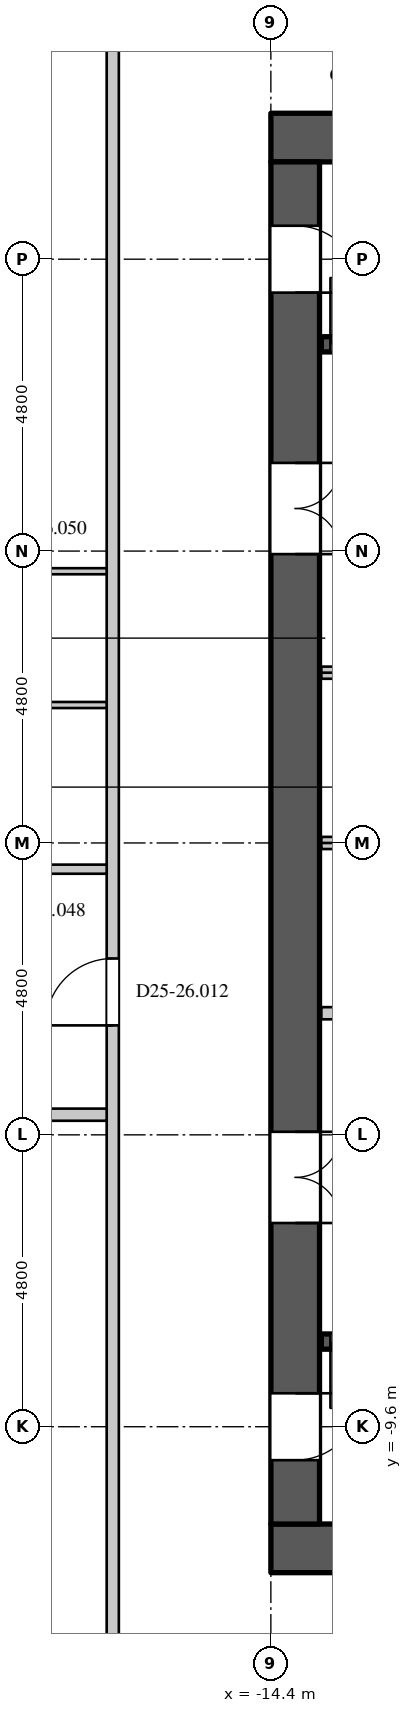
"""IFC4 building model, lengths in metres.
Left out: names, types, materials, properties, quantities, classifications, styles, units other than length and angle.
Written with IfcOpenShell. Run it as: python <this file> out.ifc"""

import sys

from ifc_helpers import new_model, si_unit, direction, frame, frame_2d, origin, place, context, subcontext, project, spatial, rectangle, extrude, element, fill, save


model = new_model("IFC4")
c1 = context("Model", 3, precision=1e-05, world=origin(), true_north=direction((0.0, 1.0)))
c2 = subcontext(c1, "Body", "Model", "MODEL_VIEW")
j1 = project(units=[si_unit("LENGTHUNIT", "METRE"), si_unit("PLANEANGLEUNIT", "RADIAN")], contexts=[c1])
p1 = place(None, origin())
s1 = spatial("IfcSite", under=j1, at=p1, CompositionType="ELEMENT")
p2 = place(p1, origin())
s2 = spatial("IfcBuilding", under=s1, at=p2, CompositionType="ELEMENT")
p3 = place(p2, frame((0.0, 0.0, 110.7)))
s3 = spatial("IfcBuildingStorey", under=s2, at=p3, CompositionType="ELEMENT", Elevation=110.7)
for number, where, z_axis, x_axis in (
    (1, (-14.4, 11.6, 0.0), (0.0, 0.0, 1.0), (1.0, 0.0, 0.0)),
    (2, (-14.4, -11.6, 0.0), (0.0, 0.0, 1.0), (1.0, 0.0, 0.0)),
):
    element("IfcWall", number, at=place(p3, frame(where, z_axis=z_axis, x_axis=x_axis)), inside=s3, PredefinedType="SHEAR", context=c2, shape_type="SweptSolid", body=[
        extrude(rectangle(XDim=28.8, YDim=0.8, at=frame_2d((14.4, 0.0))), origin(), (0.0, 0.0, 1.0), 4.2),
    ])
p4 = place(p3, frame((-14.0, -11.2, 0.0), z_axis=(0.0, 0.0, 1.0), x_axis=(0.0, 1.0, 0.0)))
e3 = element("IfcWall", 3, at=p4, inside=s3, PredefinedType="SHEAR", context=c2, shape_type="SweptSolid", body=[
    extrude(rectangle(XDim=22.4, YDim=0.8, at=frame_2d((11.2, 0.0))), origin(), (0.0, 0.0, 1.0), 4.2),
])
p5 = place(p4, frame((20.25, 0.0, 0.0)))
e4 = element("IfcOpeningElement", 4, at=p5, cuts=e3, PredefinedType="OPENING", context=c2, shape_type="SweptSolid", body=[
    extrude(rectangle(XDim=1.1, YDim=2.2, at=frame_2d((0.55, 1.1))), frame((0.0, 0.41, 0.0), z_axis=(0.0, -1.0, 0.0), x_axis=(1.0, 0.0, 0.0)), (0.0, 0.0, 1.0), 0.82),
])
p6 = place(p4, frame((1.05, 0.0, 0.0)))
e5 = element("IfcOpeningElement", 5, at=p6, cuts=e3, PredefinedType="OPENING", context=c2, shape_type="SweptSolid", body=[
    extrude(rectangle(XDim=1.1, YDim=2.2, at=frame_2d((0.55, 1.1))), frame((0.0, 0.41, 0.0), z_axis=(0.0, -1.0, 0.0), x_axis=(1.0, 0.0, 0.0)), (0.0, 0.0, 1.0), 0.82),
])
p7 = place(p4, frame((15.95, 0.0, 0.0)))
e6 = element("IfcOpeningElement", 6, at=p7, cuts=e3, PredefinedType="OPENING", context=c2, shape_type="SweptSolid", body=[
    extrude(rectangle(XDim=1.5, YDim=2.4, at=frame_2d((0.75, 1.2))), frame((0.0, 0.41, 0.0), z_axis=(0.0, -1.0, 0.0), x_axis=(1.0, 0.0, 0.0)), (0.0, 0.0, 1.0), 0.82),
])
p8 = place(p4, frame((4.95, 0.0, 0.0)))
e7 = element("IfcOpeningElement", 7, at=p8, cuts=e3, PredefinedType="OPENING", context=c2, shape_type="SweptSolid", body=[
    extrude(rectangle(XDim=1.5, YDim=2.4, at=frame_2d((0.75, 1.2))), frame((0.0, 0.41, 0.0), z_axis=(0.0, -1.0, 0.0), x_axis=(1.0, 0.0, 0.0)), (0.0, 0.0, 1.0), 0.82),
])
p9 = place(p3, frame((-17.0, -14.5, 0.0), z_axis=(0.0, 0.0, 1.0), x_axis=(0.0, 1.0, 0.0)))
e8 = element("IfcWall", 8, at=p9, inside=s3, PredefinedType="PARTITIONING", context=c2, shape_type="SweptSolid", body=[
    extrude(rectangle(XDim=29.0, YDim=0.2, at=frame_2d((14.5, 0.0))), origin(), (0.0, 0.0, 1.0), 3.95),
])
p10 = place(p9, frame((11.5, 0.0, 0.0)))
e9 = element("IfcOpeningElement", 9, at=p10, cuts=e8, PredefinedType="OPENING", context=c2, shape_type="SweptSolid", body=[
    extrude(rectangle(XDim=1.1, YDim=2.4, at=frame_2d((0.55, 1.2))), frame((0.0, 0.11, 0.0), z_axis=(0.0, -1.0, 0.0), x_axis=(1.0, 0.0, 0.0)), (0.0, 0.0, 1.0), 0.22),
])
p11 = place(p3, frame((-21.547, -11.471, 0.0), z_axis=(0.0, 0.0, 1.0), x_axis=(0.707106781187, -0.707106781187, 0.0)))
e10 = element("IfcWall", 10, at=p11, inside=s3, PredefinedType="PARTITIONING", context=c2, shape_type="SweptSolid", body=[
    extrude(rectangle(XDim=7.125, YDim=0.15, at=frame_2d((3.562, 0.0))), origin(), (0.0, 0.0, 1.0), 3.95),
])
p12 = place(p11, frame((2.85, 0.0, 0.0)))
e11 = element("IfcOpeningElement", 11, at=p12, cuts=e10, PredefinedType="OPENING", context=c2, shape_type="SweptSolid", body=[
    extrude(rectangle(XDim=0.95, YDim=2.2, at=frame_2d((0.475, 1.1))), frame((0.0, 0.085, 0.0), z_axis=(0.0, -1.0, 0.0), x_axis=(1.0, 0.0, 0.0)), (0.0, 0.0, 1.0), 0.17),
])
p13 = place(p3, frame((-21.547, 11.471, 0.0), z_axis=(0.0, 0.0, 1.0), x_axis=(0.707106781187, 0.707106781187, 0.0)))
e12 = element("IfcWall", 12, at=p13, inside=s3, PredefinedType="PARTITIONING", context=c2, shape_type="SweptSolid", body=[
    extrude(rectangle(XDim=7.05, YDim=0.15, at=frame_2d((3.525, 0.0))), origin(), (0.0, 0.0, 1.0), 3.95),
])
p14 = place(p13, frame((2.85, 0.0, 0.0)))
e13 = element("IfcOpeningElement", 13, at=p14, cuts=e12, PredefinedType="OPENING", context=c2, shape_type="SweptSolid", body=[
    extrude(rectangle(XDim=0.95, YDim=2.2, at=frame_2d((0.475, 1.1))), frame((0.0, 0.085, 0.0), z_axis=(0.0, -1.0, 0.0), x_axis=(1.0, 0.0, 0.0)), (0.0, 0.0, 1.0), 0.17),
])
p15 = place(p3, frame((-20.725, -0.431, 0.0), z_axis=(0.0, 0.0, 1.0), x_axis=(1.0, 0.0, 0.0)))
e14 = element("IfcWall", 14, at=p15, inside=s3, PredefinedType="PARTITIONING", context=c2, shape_type="SweptSolid", body=[
    extrude(rectangle(XDim=3.625, YDim=0.15, at=frame_2d((1.812, 0.0))), origin(), (0.0, 0.0, 1.0), 3.95),
])
p16 = place(p15, frame((0.85, 0.0, 0.0)))
e15 = element("IfcOpeningElement", 15, at=p16, cuts=e14, PredefinedType="OPENING", context=c2, shape_type="SweptSolid", body=[
    extrude(rectangle(XDim=0.95, YDim=2.2, at=frame_2d((0.475, 1.1))), frame((0.0, 0.085, 0.0), z_axis=(0.0, -1.0, 0.0), x_axis=(1.0, 0.0, 0.0)), (0.0, 0.0, 1.0), 0.17),
])
p17 = place(p3, frame((-25.65, -4.469, 0.0), z_axis=(0.0, 0.0, 1.0), x_axis=(1.0, 0.0, 0.0)))
e16 = element("IfcWall", 16, at=p17, inside=s3, PredefinedType="PARTITIONING", context=c2, shape_type="SweptSolid", body=[
    extrude(rectangle(XDim=8.55, YDim=0.2, at=frame_2d((4.275, 0.0))), origin(), (0.0, 0.0, 1.0), 3.3),
])
p18 = place(p3, frame((-13.57, -2.8, 0.0), z_axis=(0.0, 0.0, 1.0), x_axis=(1.0, 0.0, 0.0)))
e17 = element("IfcWall", 17, at=p18, inside=s3, PredefinedType="PARTITIONING", context=c2, shape_type="SweptSolid", body=[
    extrude(rectangle(XDim=3.19, YDim=0.2, at=frame_2d((1.595, 0.0))), origin(), (0.0, 0.0, 1.0), 3.95),
])
p19 = place(p18, frame((1.25, 0.0, 0.0)))
e18 = element("IfcOpeningElement", 18, at=p19, cuts=e17, PredefinedType="OPENING", context=c2, shape_type="SweptSolid", body=[
    extrude(rectangle(XDim=0.6, YDim=2.0, at=frame_2d((0.3, 1.0))), frame((0.0, 0.11, 0.0), z_axis=(0.0, -1.0, 0.0), x_axis=(1.0, 0.0, 0.0)), (0.0, 0.0, 1.0), 0.22),
])
p20 = place(p3, frame((-13.57, 0.0, 0.0), z_axis=(0.0, 0.0, 1.0), x_axis=(1.0, 0.0, 0.0)))
e19 = element("IfcWall", 19, at=p20, inside=s3, PredefinedType="PARTITIONING", context=c2, shape_type="SweptSolid", body=[
    extrude(rectangle(XDim=23.97, YDim=0.2, at=frame_2d((11.985, 0.0))), origin(), (0.0, 0.0, 1.0), 3.95),
])
p21 = place(p3, frame((-13.57, 2.8, 0.0), z_axis=(0.0, 0.0, 1.0), x_axis=(1.0, 0.0, 0.0)))
e20 = element("IfcWall", 20, at=p21, inside=s3, PredefinedType="PARTITIONING", context=c2, shape_type="SweptSolid", body=[
    extrude(rectangle(XDim=23.97, YDim=0.2, at=frame_2d((11.985, 0.0))), origin(), (0.0, 0.0, 1.0), 3.95),
])
p22 = place(p21, frame((1.0, 0.0, 0.0)))
e21 = element("IfcOpeningElement", 21, at=p22, cuts=e20, PredefinedType="OPENING", context=c2, shape_type="SweptSolid", body=[
    extrude(rectangle(XDim=1.1, YDim=2.2, at=frame_2d((0.55, 1.1))), frame((0.0, 0.11, 0.0), z_axis=(0.0, -1.0, 0.0), x_axis=(1.0, 0.0, 0.0)), (0.0, 0.0, 1.0), 0.22),
])
p23 = place(p21, frame((3.9, 0.0, 0.0)))
e22 = element("IfcOpeningElement", 22, at=p23, cuts=e20, PredefinedType="OPENING", context=c2, shape_type="SweptSolid", body=[
    extrude(rectangle(XDim=1.1, YDim=2.2, at=frame_2d((0.55, 1.1))), frame((0.0, 0.11, 0.0), z_axis=(0.0, -1.0, 0.0), x_axis=(1.0, 0.0, 0.0)), (0.0, 0.0, 1.0), 0.22),
])
p24 = place(p21, frame((6.5, 0.0, 0.0)))
e23 = element("IfcOpeningElement", 23, at=p24, cuts=e20, PredefinedType="OPENING", context=c2, shape_type="SweptSolid", body=[
    extrude(rectangle(XDim=1.1, YDim=2.2, at=frame_2d((0.55, 1.1))), frame((0.0, 0.11, 0.0), z_axis=(0.0, -1.0, 0.0), x_axis=(1.0, 0.0, 0.0)), (0.0, 0.0, 1.0), 0.22),
])
p25 = place(p21, frame((9.1, 0.0, 0.0)))
e24 = element("IfcOpeningElement", 24, at=p25, cuts=e20, PredefinedType="OPENING", context=c2, shape_type="SweptSolid", body=[
    extrude(rectangle(XDim=1.1, YDim=2.2, at=frame_2d((0.55, 1.1))), frame((0.0, 0.11, 0.0), z_axis=(0.0, -1.0, 0.0), x_axis=(1.0, 0.0, 0.0)), (0.0, 0.0, 1.0), 0.22),
])
p26 = place(p21, frame((11.7, 0.0, 0.0)))
e25 = element("IfcOpeningElement", 25, at=p26, cuts=e20, PredefinedType="OPENING", context=c2, shape_type="SweptSolid", body=[
    extrude(rectangle(XDim=1.1, YDim=2.2, at=frame_2d((0.55, 1.1))), frame((0.0, 0.11, 0.0), z_axis=(0.0, -1.0, 0.0), x_axis=(1.0, 0.0, 0.0)), (0.0, 0.0, 1.0), 0.22),
])
p27 = place(p21, frame((14.3, 0.0, 0.0)))
e26 = element("IfcOpeningElement", 26, at=p27, cuts=e20, PredefinedType="OPENING", context=c2, shape_type="SweptSolid", body=[
    extrude(rectangle(XDim=1.1, YDim=2.2, at=frame_2d((0.55, 1.1))), frame((0.0, 0.11, 0.0), z_axis=(0.0, -1.0, 0.0), x_axis=(1.0, 0.0, 0.0)), (0.0, 0.0, 1.0), 0.22),
])
p28 = place(p21, frame((16.9, 0.0, 0.0)))
e27 = element("IfcOpeningElement", 27, at=p28, cuts=e20, PredefinedType="OPENING", context=c2, shape_type="SweptSolid", body=[
    extrude(rectangle(XDim=1.1, YDim=2.2, at=frame_2d((0.55, 1.1))), frame((0.0, 0.11, 0.0), z_axis=(0.0, -1.0, 0.0), x_axis=(1.0, 0.0, 0.0)), (0.0, 0.0, 1.0), 0.22),
])
p29 = place(p21, frame((19.5, 0.0, 0.0)))
e28 = element("IfcOpeningElement", 28, at=p29, cuts=e20, PredefinedType="OPENING", context=c2, shape_type="SweptSolid", body=[
    extrude(rectangle(XDim=1.1, YDim=2.2, at=frame_2d((0.55, 1.1))), frame((0.0, 0.11, 0.0), z_axis=(0.0, -1.0, 0.0), x_axis=(1.0, 0.0, 0.0)), (0.0, 0.0, 1.0), 0.22),
])
p30 = place(p3, frame((-13.57, -8.2, 0.0), z_axis=(0.0, 0.0, 1.0), x_axis=(1.0, 0.0, 0.0)))
e29 = element("IfcWall", 29, at=p30, inside=s3, PredefinedType="SHEAR", context=c2, shape_type="SweptSolid", body=[
    extrude(rectangle(XDim=8.295, YDim=0.25, at=frame_2d((4.147, 0.0))), origin(), (0.0, 0.0, 1.0), 3.95),
])
p31 = place(p30, frame((0.15, 0.0, 0.0)))
e30 = element("IfcOpeningElement", 30, at=p31, cuts=e29, PredefinedType="OPENING", context=c2, shape_type="SweptSolid", body=[
    extrude(rectangle(XDim=1.1, YDim=2.2, at=frame_2d((0.55, 1.1))), frame((0.0, 0.135, 0.0), z_axis=(0.0, -1.0, 0.0), x_axis=(1.0, 0.0, 0.0)), (0.0, 0.0, 1.0), 0.27),
])
p32 = place(p3, frame((-13.57, 8.2, 0.0), z_axis=(0.0, 0.0, 1.0), x_axis=(1.0, 0.0, 0.0)))
e31 = element("IfcWall", 31, at=p32, inside=s3, PredefinedType="SHEAR", context=c2, shape_type="SweptSolid", body=[
    extrude(rectangle(XDim=8.295, YDim=0.25, at=frame_2d((4.147, 0.0))), origin(), (0.0, 0.0, 1.0), 3.95),
])
p33 = place(p32, frame((0.15, 0.0, 0.0)))
e32 = element("IfcOpeningElement", 32, at=p33, cuts=e31, PredefinedType="OPENING", context=c2, shape_type="SweptSolid", body=[
    extrude(rectangle(XDim=1.1, YDim=2.2, at=frame_2d((0.55, 1.1))), frame((0.0, 0.135, 0.0), z_axis=(0.0, -1.0, 0.0), x_axis=(1.0, 0.0, 0.0)), (0.0, 0.0, 1.0), 0.27),
])
p34 = place(p3, frame((-20.78, 4.469, 0.0), z_axis=(0.0, 0.0, 1.0), x_axis=(1.0, 0.0, 0.0)))
e33 = element("IfcWall", 33, at=p34, inside=s3, PredefinedType="PARTITIONING", context=c2, shape_type="SweptSolid", body=[
    extrude(rectangle(XDim=3.68, YDim=0.1, at=frame_2d((1.84, 0.0))), origin(), (0.0, 0.0, 1.0), 3.3),
])
p35 = place(p34, frame((0.95, 0.0, 0.0)))
e34 = element("IfcOpeningElement", 34, at=p35, cuts=e33, PredefinedType="OPENING", context=c2, shape_type="SweptSolid", body=[
    extrude(rectangle(XDim=0.9, YDim=2.2, at=frame_2d((0.45, 1.1))), frame((0.0, 0.06, 0.0), z_axis=(0.0, -1.0, 0.0), x_axis=(1.0, 0.0, 0.0)), (0.0, 0.0, 1.0), 0.12),
])
p36 = place(p3, frame((-20.725, 2.269, 0.0), z_axis=(0.0, 0.0, 1.0), x_axis=(1.0, 0.0, 0.0)))
e35 = element("IfcWall", 35, at=p36, inside=s3, PredefinedType="PARTITIONING", context=c2, shape_type="SweptSolid", body=[
    extrude(rectangle(XDim=3.625, YDim=0.1, at=frame_2d((1.812, 0.0))), origin(), (0.0, 0.0, 1.0), 3.95),
])
p37 = place(p33, origin())
e36 = element("IfcDoor", 36, at=p37, inside=s3, OperationType="SINGLE_SWING_LEFT", PredefinedType="DOOR", context=c2, shape_type="SweptSolid", body=[
    extrude(rectangle(XDim=1.1, YDim=2.2, at=frame_2d((0.55, 1.1))), frame((0.0, 0.025, 0.0), z_axis=(0.0, -1.0, 0.0), x_axis=(1.0, 0.0, 0.0)), (0.0, 0.0, 1.0), 0.05),
])
fill(e32, e36)
p38 = place(p31, origin())
e37 = element("IfcDoor", 37, at=p38, inside=s3, OperationType="SINGLE_SWING_RIGHT", PredefinedType="DOOR", context=c2, shape_type="SweptSolid", body=[
    extrude(rectangle(XDim=1.1, YDim=2.2, at=frame_2d((0.55, 1.1))), frame((0.0, 0.025, 0.0), z_axis=(0.0, -1.0, 0.0), x_axis=(1.0, 0.0, 0.0)), (0.0, 0.0, 1.0), 0.05),
])
fill(e30, e37)
p39 = place(p5, origin())
e38 = element("IfcDoor", 38, at=p39, inside=s3, OperationType="SINGLE_SWING_RIGHT", PredefinedType="DOOR", context=c2, shape_type="SweptSolid", body=[
    extrude(rectangle(XDim=1.1, YDim=2.2, at=frame_2d((0.55, 1.1))), frame((0.0, -0.345, 0.0), z_axis=(0.0, -1.0, 0.0), x_axis=(1.0, 0.0, 0.0)), (0.0, 0.0, 1.0), 0.05),
])
fill(e4, e38)
p40 = place(p6, origin())
e39 = element("IfcDoor", 39, at=p40, inside=s3, OperationType="SINGLE_SWING_LEFT", PredefinedType="DOOR", context=c2, shape_type="SweptSolid", body=[
    extrude(rectangle(XDim=1.1, YDim=2.2, at=frame_2d((0.55, 1.1))), frame((0.0, -0.345, 0.0), z_axis=(0.0, -1.0, 0.0), x_axis=(1.0, 0.0, 0.0)), (0.0, 0.0, 1.0), 0.05),
])
fill(e5, e39)
p41 = place(p7, origin())
e40 = element("IfcDoor", 40, at=p41, inside=s3, OperationType="DOUBLE_DOOR_SINGLE_SWING", PredefinedType="DOOR", context=c2, shape_type="SweptSolid", body=[
    extrude(rectangle(XDim=1.5, YDim=2.4, at=frame_2d((0.75, 1.2))), frame((0.0, -0.345, 0.0), z_axis=(0.0, -1.0, 0.0), x_axis=(1.0, 0.0, 0.0)), (0.0, 0.0, 1.0), 0.05),
])
fill(e6, e40)
p42 = place(p8, origin())
e41 = element("IfcDoor", 41, at=p42, inside=s3, OperationType="DOUBLE_DOOR_SINGLE_SWING", PredefinedType="DOOR", context=c2, shape_type="SweptSolid", body=[
    extrude(rectangle(XDim=1.5, YDim=2.4, at=frame_2d((0.75, 1.2))), frame((0.0, -0.345, 0.0), z_axis=(0.0, -1.0, 0.0), x_axis=(1.0, 0.0, 0.0)), (0.0, 0.0, 1.0), 0.05),
])
fill(e7, e41)
p43 = place(p10, origin())
e42 = element("IfcDoor", 42, at=p43, inside=s3, OperationType="SINGLE_SWING_LEFT", PredefinedType="DOOR", context=c2, shape_type="SweptSolid", body=[
    extrude(rectangle(XDim=1.1, YDim=2.4, at=frame_2d((0.55, 1.2))), frame((0.0, 0.025, 0.0), z_axis=(0.0, -1.0, 0.0), x_axis=(1.0, 0.0, 0.0)), (0.0, 0.0, 1.0), 0.05),
])
fill(e9, e42)
save(model, sys.argv[1])
